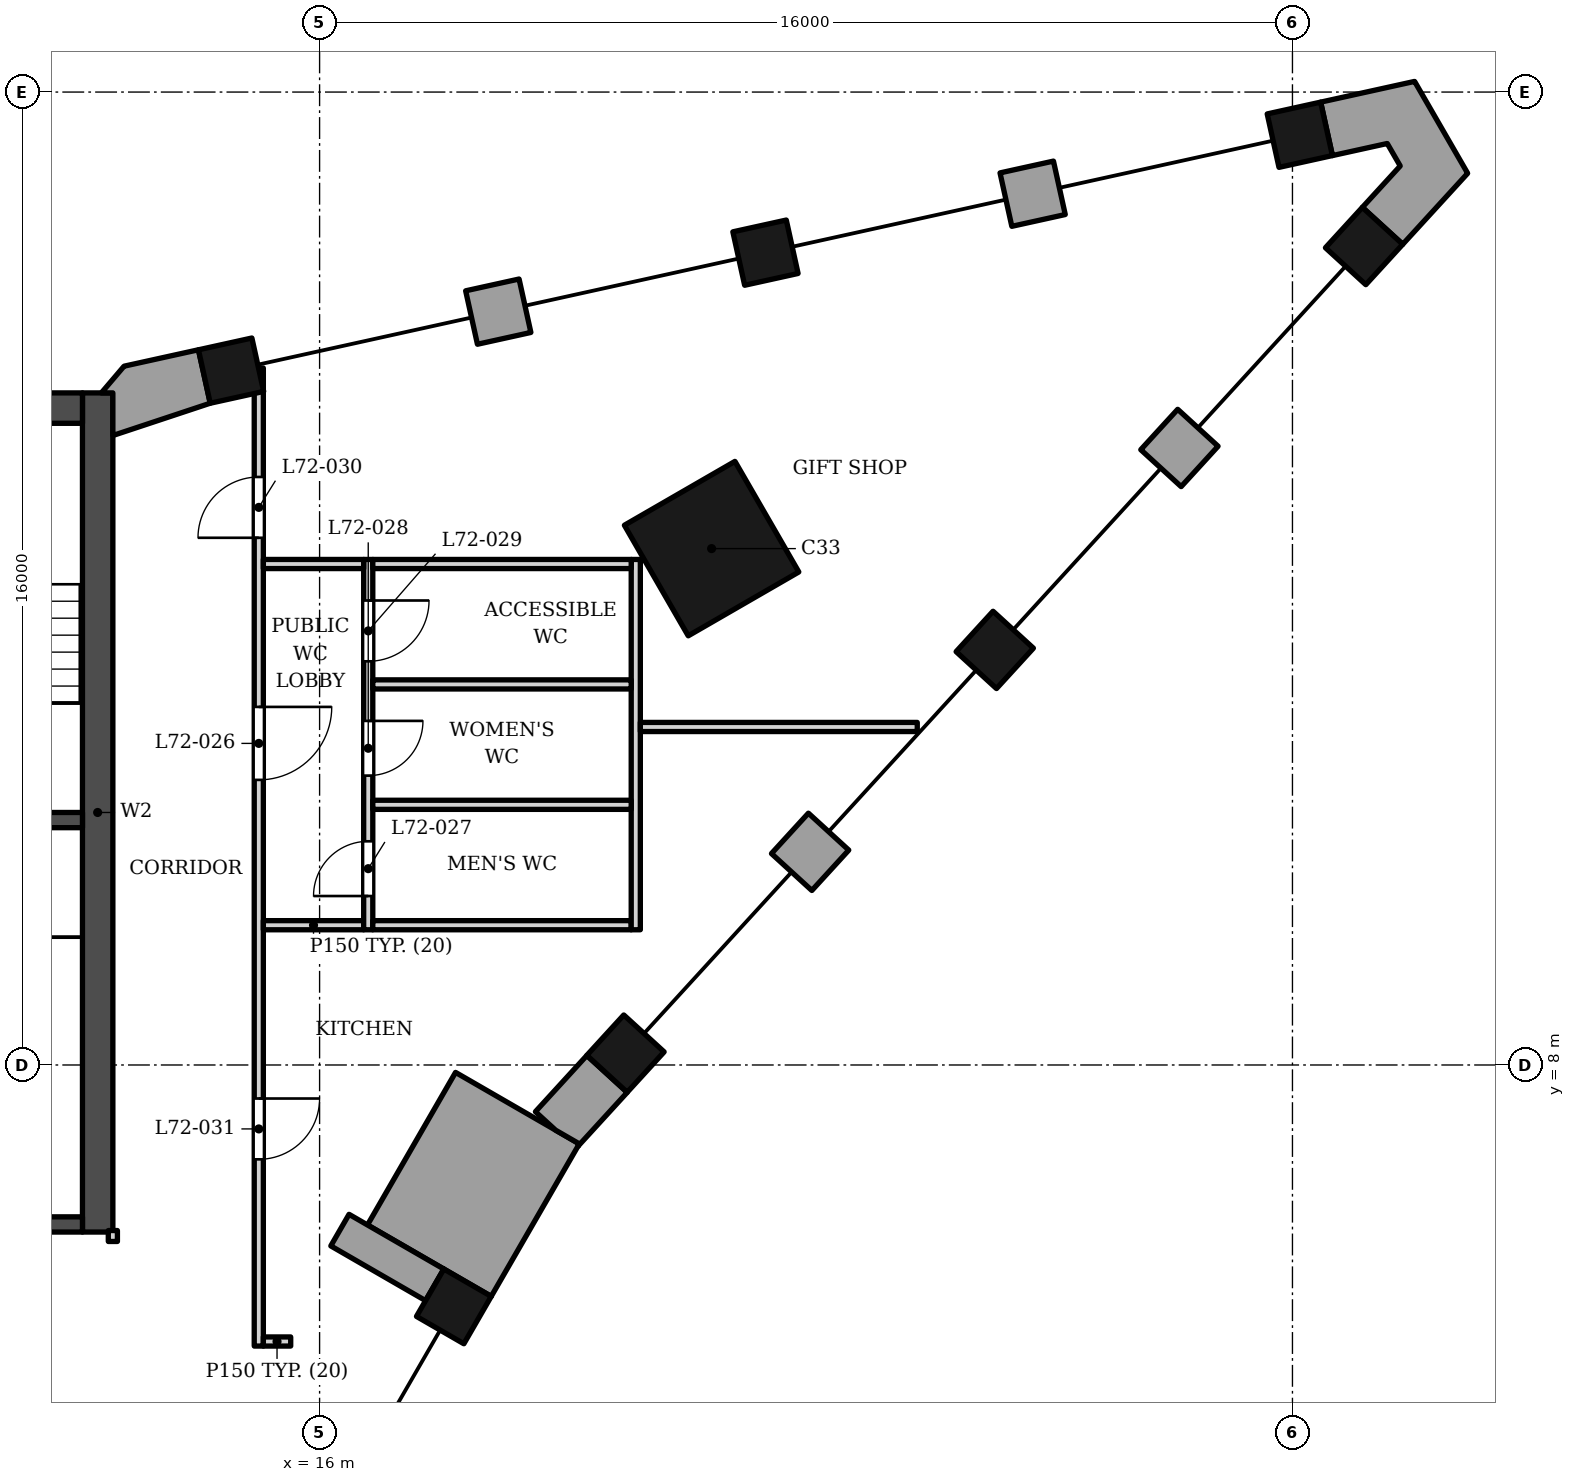
"""IFC4 building model, lengths in metres.
Left out: names, types, materials, properties, quantities, classifications, styles, units other than length and angle.
Written with IfcOpenShell. Run it as: python <this file> out.ifc"""

import sys

from ifc_helpers import new_model, si_unit, direction, frame, frame_2d, origin, origin_2d, place, context, subcontext, project, spatial, polyline, rectangle, outline, extrude, element, fill, save


model = new_model("IFC4")
c1 = context("Model", 3, precision=1e-05, world=origin(), true_north=direction((0.0, 1.0)))
c2 = subcontext(c1, "Body", "Model", "MODEL_VIEW")
j1 = project(units=[si_unit("LENGTHUNIT", "METRE"), si_unit("PLANEANGLEUNIT", "RADIAN")], contexts=[c1])
p1 = place(None, origin())
s1 = spatial("IfcSite", under=j1, at=p1, CompositionType="ELEMENT")
p2 = place(p1, origin())
s2 = spatial("IfcBuilding", under=s1, at=p2, CompositionType="ELEMENT")
p3 = place(p2, frame((0.0, 0.0, 302.5)))
s3 = spatial("IfcBuildingStorey", under=s2, at=p3, CompositionType="ELEMENT", Elevation=302.5)
p4 = place(p3, frame((-12.1, 18.802, 0.0), z_axis=(0.0, 0.0, 1.0), x_axis=(1.0, 0.0, 0.0)))
e1 = element("IfcWall", 1, at=p4, inside=s3, PredefinedType="SHEAR", context=c2, shape_type="SweptSolid", body=[
    extrude(rectangle(XDim=24.2, YDim=0.5, at=frame_2d((12.1, 0.0))), origin(), (0.0, 0.0, 1.0), 8.0),
])
p5 = place(p3, frame((12.35, 5.253, 0.0), z_axis=(0.0, 0.0, 1.0), x_axis=(0.0, 1.0, 0.0)))
e2 = element("IfcWall", 2, at=p5, inside=s3, PredefinedType="SHEAR", context=c2, shape_type="SweptSolid", body=[
    extrude(rectangle(XDim=13.8, YDim=0.5, at=frame_2d((6.9, 0.0))), origin(), (0.0, 0.0, 1.0), 8.0),
])
for number, where, z_axis, x_axis in (
    (3, (8.35, 12.028, 0.0), (0.0, 0.0, 1.0), (1.0, 0.0, 0.0)),
    (4, (8.35, 5.378, 0.0), (0.0, 0.0, 1.0), (1.0, 0.0, 0.0)),
):
    element("IfcWall", number, at=place(p3, frame(where, z_axis=z_axis, x_axis=x_axis)), inside=s3, PredefinedType="SHEAR", context=c2, shape_type="SweptSolid", body=[
        extrude(rectangle(XDim=3.75, YDim=0.25, at=frame_2d((1.875, 0.0))), origin(), (0.0, 0.0, 1.0), 8.0),
    ])
p6 = place(p3, frame((22.447, 16.492, 0.0), z_axis=(0.0, 0.0, 1.0), x_axis=(-0.866025395058, -0.500000015115, 0.0)))
e5 = element("IfcColumn", 5, at=p6, inside=s3, PredefinedType="COLUMN", context=c2, shape_type="SweptSolid", body=[
    extrude(rectangle(XDim=2.1, YDim=2.1, at=origin_2d()), origin(), (0.0, 0.0, 1.0), 8.0),
])
for number, where, z_axis, x_axis in (
    (6, (18.208, 4.03, 0.0), (0.0, 0.0, 1.0), (0.5, 0.866, 0.0)),
    (7, (21.031, 8.187, 0.0), (0.0, 0.0, 1.0), (0.675, 0.738, 0.0)),
    (8, (27.104, 14.826, 0.0), (0.0, 0.0, 1.0), (0.675, 0.738, 0.0)),
    (9, (33.178, 21.468, 0.0), (0.0, 0.0, 1.0), (0.675, 0.738, 0.0)),
    (10, (32.121, 23.298, 0.0), (0.0, 0.0, 1.0), (-0.977, -0.215, 0.0)),
    (11, (23.333, 21.359, 0.0), (0.0, 0.0, 1.0), (-0.977, -0.215, 0.0)),
    (12, (14.544, 19.419, 0.0), (0.0, 0.0, 1.0), (-0.977, -0.215, 0.0)),
):
    element("IfcColumn", number, at=place(p3, frame(where, z_axis=z_axis, x_axis=x_axis)), inside=s3, PredefinedType="COLUMN", context=c2, shape_type="SweptSolid", body=[
        extrude(rectangle(XDim=0.9, YDim=0.9, at=origin_2d()), origin(), (0.0, 0.0, 1.0), 8.0),
    ])
p7 = place(p3, frame((17.893, 4.385, 0.0), z_axis=(0.0, 0.0, 1.0), x_axis=(-0.866047807691, 0.499961193289, 0.0)))
e13 = element("IfcWall", 13, at=p7, inside=s3, PredefinedType="SOLIDWALL", context=c2, shape_type="SweptSolid", body=[
    extrude(rectangle(XDim=1.8, YDim=0.6, at=frame_2d((0.9, 0.0))), origin(), (0.0, 0.0, 1.0), 7.0),
])
p8 = place(p3, frame((16.183, 0.522, 0.0), z_axis=(0.0, 0.0, 1.0), x_axis=(0.500012057535, 0.866018442252, 0.0)))
e14 = element("IfcWall", 14, at=p8, inside=s3, PredefinedType="PARAPET", context=c2, shape_type="SweptSolid", body=[
    extrude(rectangle(XDim=3.6, YDim=0.2, at=frame_2d((1.8, 0.0))), origin(), (0.0, 0.0, 1.0), 1.1),
])
p9 = place(p3, origin())
e15 = element("IfcWall", 15, at=p9, inside=s3, PredefinedType="SOLIDWALL", context=c2, shape_type="SweptSolid", body=[
    extrude(outline(polyline([(18.823, 4.195), (18.823, 4.194), (18.823, 4.194), (20.271, 6.703), (18.236, 7.878), (16.787, 5.369), (18.043, 4.644), (18.043, 4.645), (18.823, 4.195)])), origin(), (0.0, 0.0, 1.0), 7.0),
])
p10 = place(p3, frame((23.764, 11.173, 0.0), z_axis=(0.0, 0.0, 1.0), x_axis=(0.674802966049, 0.737997938352, 0.0)))
e16 = element("IfcWall", 16, at=p10, inside=s3, PredefinedType="SOLIDWALL", context=c2, shape_type="SweptSolid", body=[
    extrude(rectangle(XDim=0.9, YDim=0.9, at=frame_2d((0.45, 0.0))), origin(), (0.0, 0.0, 1.0), 7.0),
])
p11 = place(p3, frame((30.445, 18.479, 0.0), z_axis=(0.0, 0.0, 1.0), x_axis=(-0.674938051731, -0.737874397391, 0.0)))
e17 = element("IfcWall", 17, at=p11, inside=s3, PredefinedType="SOLIDWALL", context=c2, shape_type="SweptSolid", body=[
    extrude(rectangle(XDim=0.9, YDim=0.9, at=frame_2d((0.45, 0.0))), origin(), (0.0, 0.0, 1.0), 7.0),
])
for number, where, z_axis, x_axis in (
    (18, (28.167, 22.425, 0.0), (0.0, 0.0, 1.0), (-0.976, -0.216, 0.0)),
    (19, (18.499, 20.292, 0.0), (0.0, 0.0, 1.0), (0.976, 0.216, 0.0)),
):
    element("IfcWall", number, at=place(p3, frame(where, z_axis=z_axis, x_axis=x_axis)), inside=s3, PredefinedType="SOLIDWALL", context=c2, shape_type="SweptSolid", body=[
        extrude(rectangle(XDim=0.9, YDim=0.9, at=frame_2d((0.45, 0.0))), origin(), (0.0, 0.0, 1.0), 7.0),
    ])
p12 = place(p3, origin())
e20 = element("IfcWall", 20, at=p12, inside=s3, PredefinedType="SOLIDWALL", context=c2, shape_type="SweptSolid", body=[
    extrude(outline(polyline([(20.395, 8.156), (19.549, 7.232), (19.881, 6.928), (20.271, 6.703), (20.247, 6.661), (21.059, 7.549), (20.395, 8.156)])), origin(), (0.0, 0.0, 1.0), 7.0),
])
p13 = place(p3, origin())
e21 = element("IfcWall", 21, at=p13, inside=s3, PredefinedType="SOLIDWALL", context=c2, shape_type="SweptSolid", body=[
    extrude(outline(polyline([(33.814, 21.496), (34.882, 22.664), (34.009, 24.175), (32.464, 23.834), (32.658, 22.955), (33.559, 23.154), (33.772, 22.785), (33.15, 22.104), (33.814, 21.496)])), origin(), (0.0, 0.0, 1.0), 7.0),
])
p14 = place(p3, origin())
e22 = element("IfcWall", 22, at=p14, inside=s3, PredefinedType="SOLIDWALL", context=c2, shape_type="SweptSolid", body=[
    extrude(outline(polyline([(14.201, 18.883), (14.008, 19.762), (12.784, 19.492), (12.41, 19.052), (12.6, 19.052), (12.6, 18.352), (14.201, 18.883)])), origin(), (0.0, 0.0, 1.0), 7.0),
])
p15 = place(p3, frame((15.0, 3.378, 0.0), z_axis=(0.0, 0.0, 1.0), x_axis=(0.0, 1.0, 0.0)))
e23 = element("IfcWall", 23, at=p15, inside=s3, PredefinedType="PARTITIONING", context=c2, shape_type="SweptSolid", body=[
    extrude(rectangle(XDim=16.084, YDim=0.15, at=frame_2d((8.042, 0.0))), origin(), (0.0, 0.0, 1.0), 7.02),
])
p16 = place(p15, frame((9.311, 0.0, 0.0)))
e24 = element("IfcOpeningElement", 24, at=p16, cuts=e23, PredefinedType="OPENING", context=c2, shape_type="SweptSolid", body=[
    extrude(rectangle(XDim=1.2, YDim=2.1, at=frame_2d((0.6, 1.05))), frame((0.0, 0.085, 0.0), z_axis=(0.0, -1.0, 0.0), x_axis=(1.0, 0.0, 0.0)), (0.0, 0.0, 1.0), 0.17),
])
p17 = place(p15, frame((13.292, 0.0, 0.0)))
e25 = element("IfcOpeningElement", 25, at=p17, cuts=e23, PredefinedType="OPENING", context=c2, shape_type="SweptSolid", body=[
    extrude(rectangle(XDim=1.0, YDim=2.1, at=frame_2d((0.5, 1.05))), frame((0.0, 0.085, 0.0), z_axis=(0.0, -1.0, 0.0), x_axis=(1.0, 0.0, 0.0)), (0.0, 0.0, 1.0), 0.17),
])
p18 = place(p15, frame((3.071, 0.0, 0.0)))
e26 = element("IfcOpeningElement", 26, at=p18, cuts=e23, PredefinedType="OPENING", context=c2, shape_type="SweptSolid", body=[
    extrude(rectangle(XDim=1.0, YDim=2.1, at=frame_2d((0.5, 1.05))), frame((0.0, 0.085, 0.0), z_axis=(0.0, -1.0, 0.0), x_axis=(1.0, 0.0, 0.0)), (0.0, 0.0, 1.0), 0.17),
])
p19 = place(p3, frame((15.075, 3.453, 0.0), z_axis=(0.0, 0.0, 1.0), x_axis=(1.0, 0.0, 0.0)))
e27 = element("IfcWall", 27, at=p19, inside=s3, PredefinedType="PARTITIONING", context=c2, shape_type="SweptSolid", body=[
    extrude(rectangle(XDim=0.45, YDim=0.15, at=frame_2d((0.225, 0.0))), origin(), (0.0, 0.0, 1.0), 7.8),
])
p20 = place(p3, frame((12.6, 5.098, 0.0), z_axis=(0.0, 0.0, 1.0), x_axis=(0.0, 1.0, 0.0)))
e28 = element("IfcWall", 28, at=p20, inside=s3, PredefinedType="PARTITIONING", context=c2, shape_type="SweptSolid", body=[
    extrude(rectangle(XDim=0.18, YDim=0.15, at=frame_2d((0.09, 0.0))), origin(), (0.0, 0.0, 1.0), 7.8),
])
p21 = place(p3, frame((15.075, 10.299, 0.0), z_axis=(0.0, 0.0, 1.0), x_axis=(1.0, 0.0, 0.0)))
e29 = element("IfcWall", 29, at=p21, inside=s3, PredefinedType="PARTITIONING", context=c2, shape_type="SweptSolid", body=[
    extrude(rectangle(XDim=1.65, YDim=0.15, at=frame_2d((0.825, 0.0))), origin(), (0.0, 0.0, 1.0), 7.8),
])
p22 = place(p3, frame((16.8, 10.224, 0.0), z_axis=(0.0, 0.0, 1.0), x_axis=(0.0, 1.0, 0.0)))
e30 = element("IfcWall", 30, at=p22, inside=s3, PredefinedType="PARTITIONING", context=c2, shape_type="SweptSolid", body=[
    extrude(rectangle(XDim=6.09, YDim=0.15, at=frame_2d((3.045, 0.0))), origin(), (0.0, 0.0, 1.0), 7.8),
])
p23 = place(p22, frame((0.555, 0.0, 0.0)))
e31 = element("IfcOpeningElement", 31, at=p23, cuts=e30, PredefinedType="OPENING", context=c2, shape_type="SweptSolid", body=[
    extrude(rectangle(XDim=0.9, YDim=2.1, at=frame_2d((0.45, 1.05))), frame((0.0, 0.085, 0.0), z_axis=(0.0, -1.0, 0.0), x_axis=(1.0, 0.0, 0.0)), (0.0, 0.0, 1.0), 0.17),
])
p24 = place(p22, frame((2.535, 0.0, 0.0)))
e32 = element("IfcOpeningElement", 32, at=p24, cuts=e30, PredefinedType="OPENING", context=c2, shape_type="SweptSolid", body=[
    extrude(rectangle(XDim=0.9, YDim=2.1, at=frame_2d((0.45, 1.05))), frame((0.0, 0.085, 0.0), z_axis=(0.0, -1.0, 0.0), x_axis=(1.0, 0.0, 0.0)), (0.0, 0.0, 1.0), 0.17),
])
p25 = place(p22, frame((4.415, 0.0, 0.0)))
e33 = element("IfcOpeningElement", 33, at=p25, cuts=e30, PredefinedType="OPENING", context=c2, shape_type="SweptSolid", body=[
    extrude(rectangle(XDim=1.0, YDim=2.1, at=frame_2d((0.5, 1.05))), frame((0.0, 0.085, 0.0), z_axis=(0.0, -1.0, 0.0), x_axis=(1.0, 0.0, 0.0)), (0.0, 0.0, 1.0), 0.17),
])
p26 = place(p3, frame((16.875, 10.299, 0.0), z_axis=(0.0, 0.0, 1.0), x_axis=(1.0, 0.0, 0.0)))
e34 = element("IfcWall", 34, at=p26, inside=s3, PredefinedType="PARTITIONING", context=c2, shape_type="SweptSolid", body=[
    extrude(rectangle(XDim=4.25, YDim=0.15, at=frame_2d((2.125, 0.0))), origin(), (0.0, 0.0, 1.0), 7.043),
])
p27 = place(p3, frame((21.2, 10.224, 0.0), z_axis=(0.0, 0.0, 1.0), x_axis=(0.0, 1.0, 0.0)))
e35 = element("IfcWall", 35, at=p27, inside=s3, PredefinedType="PARTITIONING", context=c2, shape_type="SweptSolid", body=[
    extrude(rectangle(XDim=6.09, YDim=0.15, at=frame_2d((3.045, 0.0))), origin(), (0.0, 0.0, 1.0), 7.8),
])
p28 = place(p3, frame((16.875, 12.279, 0.0), z_axis=(0.0, 0.0, 1.0), x_axis=(1.0, 0.0, 0.0)))
e36 = element("IfcWall", 36, at=p28, inside=s3, PredefinedType="PARTITIONING", context=c2, shape_type="SweptSolid", body=[
    extrude(rectangle(XDim=4.25, YDim=0.15, at=frame_2d((2.125, 0.0))), origin(), (0.0, 0.0, 1.0), 7.043),
])
p29 = place(p3, frame((21.275, 13.559, 0.0), z_axis=(0.0, 0.0, 1.0), x_axis=(1.0, 0.0, 0.0)))
e37 = element("IfcWall", 37, at=p29, inside=s3, PredefinedType="PARTITIONING", context=c2, shape_type="SweptSolid", body=[
    extrude(rectangle(XDim=4.554, YDim=0.15, at=frame_2d((2.277, 0.0))), origin(), (0.0, 0.0, 1.0), 7.1),
])
p30 = place(p3, frame((16.875, 14.259, 0.0), z_axis=(0.0, 0.0, 1.0), x_axis=(1.0, 0.0, 0.0)))
e38 = element("IfcWall", 38, at=p30, inside=s3, PredefinedType="PARTITIONING", context=c2, shape_type="SweptSolid", body=[
    extrude(rectangle(XDim=4.25, YDim=0.15, at=frame_2d((2.125, 0.0))), origin(), (0.0, 0.0, 1.0), 7.043),
])
p31 = place(p3, frame((15.075, 16.239, 0.0), z_axis=(0.0, 0.0, 1.0), x_axis=(1.0, 0.0, 0.0)))
e39 = element("IfcWall", 39, at=p31, inside=s3, PredefinedType="PARTITIONING", context=c2, shape_type="SweptSolid", body=[
    extrude(rectangle(XDim=1.65, YDim=0.15, at=frame_2d((0.825, 0.0))), origin(), (0.0, 0.0, 1.0), 7.8),
])
p32 = place(p3, frame((16.875, 16.239, 0.0), z_axis=(0.0, 0.0, 1.0), x_axis=(1.0, 0.0, 0.0)))
e40 = element("IfcWall", 40, at=p32, inside=s3, PredefinedType="PARTITIONING", context=c2, shape_type="SweptSolid", body=[
    extrude(rectangle(XDim=4.25, YDim=0.15, at=frame_2d((2.125, 0.0))), origin(), (0.0, 0.0, 1.0), 7.043),
])
p33 = place(p16, origin())
e41 = element("IfcDoor", 41, at=p33, inside=s3, OperationType="SINGLE_SWING_RIGHT", PredefinedType="DOOR", context=c2, shape_type="SweptSolid", body=[
    extrude(rectangle(XDim=1.2, YDim=2.1, at=frame_2d((0.6, 1.05))), frame((0.0, 0.025, 0.0), z_axis=(0.0, -1.0, 0.0), x_axis=(1.0, 0.0, 0.0)), (0.0, 0.0, 1.0), 0.05),
])
fill(e24, e41)
p34 = place(p23, origin())
e42 = element("IfcDoor", 42, at=p34, inside=s3, OperationType="SINGLE_SWING_LEFT", PredefinedType="DOOR", context=c2, shape_type="SweptSolid", body=[
    extrude(rectangle(XDim=0.9, YDim=2.1, at=frame_2d((0.45, 1.05))), frame((0.0, 0.025, 0.0), z_axis=(0.0, -1.0, 0.0), x_axis=(1.0, 0.0, 0.0)), (0.0, 0.0, 1.0), 0.05),
])
fill(e31, e42)
p35 = place(p24, origin())
e43 = element("IfcDoor", 43, at=p35, inside=s3, OperationType="SINGLE_SWING_RIGHT", PredefinedType="DOOR", context=c2, shape_type="SweptSolid", body=[
    extrude(rectangle(XDim=0.9, YDim=2.1, at=frame_2d((0.45, 1.05))), frame((0.0, 0.025, 0.0), z_axis=(0.0, -1.0, 0.0), x_axis=(1.0, 0.0, 0.0)), (0.0, 0.0, 1.0), 0.05),
])
fill(e32, e43)
p36 = place(p25, origin())
e44 = element("IfcDoor", 44, at=p36, inside=s3, OperationType="SINGLE_SWING_RIGHT", PredefinedType="DOOR", context=c2, shape_type="SweptSolid", body=[
    extrude(rectangle(XDim=1.0, YDim=2.1, at=frame_2d((0.5, 1.05))), frame((0.0, 0.025, 0.0), z_axis=(0.0, -1.0, 0.0), x_axis=(1.0, 0.0, 0.0)), (0.0, 0.0, 1.0), 0.05),
])
fill(e33, e44)
p37 = place(p17, origin())
e45 = element("IfcDoor", 45, at=p37, inside=s3, OperationType="SINGLE_SWING_LEFT", PredefinedType="DOOR", context=c2, shape_type="SweptSolid", body=[
    extrude(rectangle(XDim=1.0, YDim=2.1, at=frame_2d((0.5, 1.05))), frame((0.0, 0.025, 0.0), z_axis=(0.0, -1.0, 0.0), x_axis=(1.0, 0.0, 0.0)), (0.0, 0.0, 1.0), 0.05),
])
fill(e25, e45)
p38 = place(p18, origin())
e46 = element("IfcDoor", 46, at=p38, inside=s3, OperationType="SINGLE_SWING_RIGHT", PredefinedType="DOOR", context=c2, shape_type="SweptSolid", body=[
    extrude(rectangle(XDim=1.0, YDim=2.1, at=frame_2d((0.5, 1.05))), frame((0.0, 0.025, 0.0), z_axis=(0.0, -1.0, 0.0), x_axis=(1.0, 0.0, 0.0)), (0.0, 0.0, 1.0), 0.05),
])
fill(e26, e46)
save(model, sys.argv[1])
